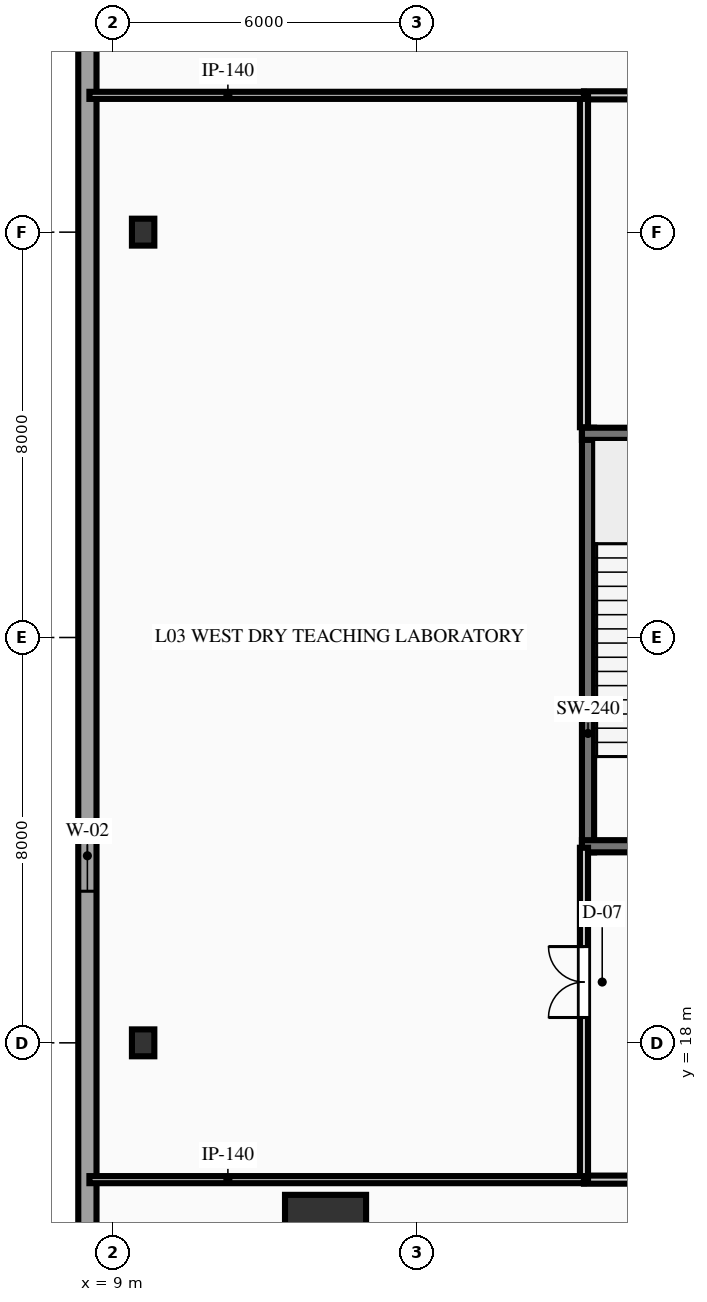
"""IFC4 building model, lengths in metres.
Left out: names, types, materials, properties, quantities, classifications, styles, units other than length and angle.
Written with IfcOpenShell. Run it as: python <this file> out.ifc"""

import sys

from ifc_helpers import new_model, si_unit, direction, frame, frame_2d, origin, origin_2d, place, context, subcontext, project, spatial, rectangle, hollow_rectangle, i_section, extrude, element, fill, save


model = new_model("IFC4")
c1 = context("Model", 3, precision=1e-05, world=origin(), true_north=direction((0.0, 1.0)))
c2 = subcontext(c1, "Body", "Model", "MODEL_VIEW")
j1 = project(units=[si_unit("LENGTHUNIT", "METRE"), si_unit("PLANEANGLEUNIT", "RADIAN")], contexts=[c1])
p1 = place(None, origin())
s1 = spatial("IfcSite", under=j1, at=p1, CompositionType="ELEMENT")
p2 = place(p1, origin())
s2 = spatial("IfcBuilding", under=s1, at=p2, CompositionType="ELEMENT")
p3 = place(p2, frame((0.0, 0.0, 16.8)))
s3 = spatial("IfcBuildingStorey", under=s2, at=p3, CompositionType="ELEMENT", Elevation=16.8)
p4 = place(p3, frame((18.38, 21.76, 0.0), z_axis=(0.0, 0.0, 1.0), x_axis=(0.0, 1.0, 0.0)))
e1 = element("IfcWall", 1, at=p4, inside=s3, PredefinedType="SHEAR", context=c2, shape_type="SweptSolid", body=[
    extrude(rectangle(XDim=8.38, YDim=0.24, at=frame_2d((4.19, 0.0))), origin(), (0.0, 0.0, 1.0), 5.4),
])
p5 = place(p3, frame((18.26, 21.88, 0.0), z_axis=(0.0, 0.0, 1.0), x_axis=(1.0, 0.0, 0.0)))
e2 = element("IfcWall", 2, at=p5, inside=s3, PredefinedType="SHEAR", context=c2, shape_type="SweptSolid", body=[
    extrude(rectangle(XDim=3.98, YDim=0.24, at=frame_2d((1.99, 0.0))), origin(), (0.0, 0.0, 1.0), 5.4),
])
p6 = place(p5, frame((1.465, 0.0, 0.0)))
e3 = element("IfcOpeningElement", 3, at=p6, cuts=e2, PredefinedType="OPENING", context=c2, shape_type="SweptSolid", body=[
    extrude(rectangle(XDim=1.05, YDim=2.15, at=frame_2d((0.525, 1.075))), frame((0.0, 0.13, 0.0), z_axis=(0.0, -1.0, 0.0), x_axis=(1.0, 0.0, 0.0)), (0.0, 0.0, 1.0), 0.26),
])
p7 = place(p3, frame((18.26, 30.02, 0.0), z_axis=(0.0, 0.0, 1.0), x_axis=(1.0, 0.0, 0.0)))
e4 = element("IfcWall", 4, at=p7, inside=s3, PredefinedType="SHEAR", context=c2, shape_type="SweptSolid", body=[
    extrude(rectangle(XDim=3.98, YDim=0.24, at=frame_2d((1.99, 0.0))), origin(), (0.0, 0.0, 1.0), 5.4),
])
p8 = place(p3, frame((13.2, 14.2, 0.0), z_axis=(0.0, 0.0, 1.0), x_axis=(1.0, 0.0, 0.0)))
e5 = element("IfcColumn", 5, at=p8, inside=s3, PredefinedType="COLUMN", context=c2, shape_type="SweptSolid", body=[
    extrude(hollow_rectangle(XDim=1.6, YDim=1.6, WallThickness=0.08, at=origin_2d()), origin(), (0.0, 0.0, 1.0), 5.4),
])
for number, where, z_axis, x_axis in (
    (6, (9.6, 18.0, 0.0), (0.0, 0.0, 1.0), (1.0, 0.0, 0.0)),
    (7, (9.6, 34.0, 0.0), (0.0, 0.0, 1.0), (1.0, 0.0, 0.0)),
):
    element("IfcColumn", number, at=place(p3, frame(where, z_axis=z_axis, x_axis=x_axis)), inside=s3, PredefinedType="COLUMN", context=c2, shape_type="SweptSolid", body=[
        extrude(i_section(OverallWidth=0.442, OverallDepth=0.531, WebThickness=0.066, FlangeThickness=0.106, at=origin_2d()), origin(), (0.0, 0.0, 1.0), 5.4),
    ])
p9 = place(p3, frame((8.5, 12.2, 0.0), z_axis=(0.0, 0.0, 1.0), x_axis=(0.0, 1.0, 0.0)))
e8 = element("IfcWall", 8, at=p9, inside=s3, PredefinedType="STANDARD", context=c2, shape_type="SweptSolid", body=[
    extrude(rectangle(XDim=31.4, YDim=0.36, at=frame_2d((15.7, 0.0))), origin(), (0.0, 0.0, 1.0), 4.98),
])
p10 = place(p9, frame((8.792, 0.0, 1.0)))
e9 = element("IfcOpeningElement", 9, at=p10, cuts=e8, PredefinedType="OPENING", context=c2, shape_type="SweptSolid", body=[
    extrude(rectangle(XDim=1.4, YDim=2.2, at=frame_2d((0.7, 1.1))), frame((0.0, 0.19, 0.0), z_axis=(0.0, -1.0, 0.0), x_axis=(1.0, 0.0, 0.0)), (0.0, 0.0, 1.0), 0.38),
])
p11 = place(p3, frame((18.3, 15.3, 0.0), z_axis=(0.0, 0.0, 1.0), x_axis=(1.0, 0.0, 0.0)))
e10 = element("IfcWall", 10, at=p11, inside=s3, PredefinedType="PARTITIONING", context=c2, shape_type="SweptSolid", body=[
    extrude(rectangle(XDim=35.4, YDim=0.16, at=frame_2d((17.7, 0.0))), origin(), (0.0, 0.0, 1.0), 4.202),
])
p12 = place(p11, frame((6.525, 0.0, 0.0)))
e11 = element("IfcOpeningElement", 11, at=p12, cuts=e10, PredefinedType="OPENING", context=c2, shape_type="SweptSolid", body=[
    extrude(rectangle(XDim=1.05, YDim=2.15, at=frame_2d((0.525, 1.075))), frame((0.0, 0.09, 0.0), z_axis=(0.0, -1.0, 0.0), x_axis=(1.0, 0.0, 0.0)), (0.0, 0.0, 1.0), 0.18),
])
p13 = place(p11, frame((16.7, 0.0, 0.0)))
e12 = element("IfcOpeningElement", 12, at=p13, cuts=e10, PredefinedType="OPENING", context=c2, shape_type="SweptSolid", body=[
    extrude(rectangle(XDim=1.4, YDim=2.2, at=frame_2d((0.7, 1.1))), frame((0.0, 0.09, 0.0), z_axis=(0.0, -1.0, 0.0), x_axis=(1.0, 0.0, 0.0)), (0.0, 0.0, 1.0), 0.18),
])
p14 = place(p11, frame((27.525, 0.0, 0.0)))
e13 = element("IfcOpeningElement", 13, at=p14, cuts=e10, PredefinedType="OPENING", context=c2, shape_type="SweptSolid", body=[
    extrude(rectangle(XDim=1.05, YDim=2.15, at=frame_2d((0.525, 1.075))), frame((0.0, 0.09, 0.0), z_axis=(0.0, -1.0, 0.0), x_axis=(1.0, 0.0, 0.0)), (0.0, 0.0, 1.0), 0.18),
])
p15 = place(p3, frame((18.3, 36.7, 0.0), z_axis=(0.0, 0.0, 1.0), x_axis=(1.0, 0.0, 0.0)))
e14 = element("IfcWall", 14, at=p15, inside=s3, PredefinedType="PARTITIONING", context=c2, shape_type="SweptSolid", body=[
    extrude(rectangle(XDim=35.4, YDim=0.16, at=frame_2d((17.7, 0.0))), origin(), (0.0, 0.0, 1.0), 4.98),
])
p16 = place(p15, frame((4.125, 0.0, 0.0)))
e15 = element("IfcOpeningElement", 15, at=p16, cuts=e14, PredefinedType="OPENING", context=c2, shape_type="SweptSolid", body=[
    extrude(rectangle(XDim=1.05, YDim=2.15, at=frame_2d((0.525, 1.075))), frame((0.0, 0.09, 0.0), z_axis=(0.0, -1.0, 0.0), x_axis=(1.0, 0.0, 0.0)), (0.0, 0.0, 1.0), 0.18),
])
p17 = place(p15, frame((16.375, 0.0, 0.0)))
e16 = element("IfcOpeningElement", 16, at=p17, cuts=e14, PredefinedType="OPENING", context=c2, shape_type="SweptSolid", body=[
    extrude(rectangle(XDim=1.05, YDim=2.15, at=frame_2d((0.525, 1.075))), frame((0.0, 0.09, 0.0), z_axis=(0.0, -1.0, 0.0), x_axis=(1.0, 0.0, 0.0)), (0.0, 0.0, 1.0), 0.18),
])
p18 = place(p15, frame((27.225, 0.0, 0.0)))
e17 = element("IfcOpeningElement", 17, at=p18, cuts=e14, PredefinedType="OPENING", context=c2, shape_type="SweptSolid", body=[
    extrude(rectangle(XDim=0.95, YDim=2.15, at=frame_2d((0.475, 1.075))), frame((0.0, 0.09, 0.0), z_axis=(0.0, -1.0, 0.0), x_axis=(1.0, 0.0, 0.0)), (0.0, 0.0, 1.0), 0.18),
])
p19 = place(p15, frame((30.275, 0.0, 0.0)))
e18 = element("IfcOpeningElement", 18, at=p19, cuts=e14, PredefinedType="OPENING", context=c2, shape_type="SweptSolid", body=[
    extrude(rectangle(XDim=0.95, YDim=2.15, at=frame_2d((0.475, 1.075))), frame((0.0, 0.09, 0.0), z_axis=(0.0, -1.0, 0.0), x_axis=(1.0, 0.0, 0.0)), (0.0, 0.0, 1.0), 0.18),
])
p20 = place(p15, frame((33.3, 0.0, 0.0)))
e19 = element("IfcOpeningElement", 19, at=p20, cuts=e14, PredefinedType="OPENING", context=c2, shape_type="SweptSolid", body=[
    extrude(rectangle(XDim=1.0, YDim=2.15, at=frame_2d((0.5, 1.075))), frame((0.0, 0.09, 0.0), z_axis=(0.0, -1.0, 0.0), x_axis=(1.0, 0.0, 0.0)), (0.0, 0.0, 1.0), 0.18),
])
p21 = place(p3, frame((18.3, 15.3, 0.0), z_axis=(0.0, 0.0, 1.0), x_axis=(0.0, 1.0, 0.0)))
e20 = element("IfcWall", 20, at=p21, inside=s3, PredefinedType="PARTITIONING", context=c2, shape_type="SweptSolid", body=[
    extrude(rectangle(XDim=6.55, YDim=0.16, at=frame_2d((3.275, 0.0))), origin(), (0.0, 0.0, 1.0), 4.98),
])
p22 = place(p21, frame((3.2, 0.0, 0.0)))
e21 = element("IfcOpeningElement", 21, at=p22, cuts=e20, PredefinedType="OPENING", context=c2, shape_type="SweptSolid", body=[
    extrude(rectangle(XDim=1.4, YDim=2.2, at=frame_2d((0.7, 1.1))), frame((0.0, 0.09, 0.0), z_axis=(0.0, -1.0, 0.0), x_axis=(1.0, 0.0, 0.0)), (0.0, 0.0, 1.0), 0.18),
])
p23 = place(p3, frame((18.3, 30.15, 0.0), z_axis=(0.0, 0.0, 1.0), x_axis=(0.0, 1.0, 0.0)))
e22 = element("IfcWall", 22, at=p23, inside=s3, PredefinedType="PARTITIONING", context=c2, shape_type="SweptSolid", body=[
    extrude(rectangle(XDim=6.55, YDim=0.16, at=frame_2d((3.275, 0.0))), origin(), (0.0, 0.0, 1.0), 4.98),
])
p24 = place(p3, frame((8.54, 15.3, 0.0), z_axis=(0.0, 0.0, 1.0), x_axis=(1.0, 0.0, 0.0)))
e23 = element("IfcWall", 23, at=p24, inside=s3, PredefinedType="PARTITIONING", context=c2, shape_type="SweptSolid", body=[
    extrude(rectangle(XDim=9.76, YDim=0.14, at=frame_2d((4.88, 0.0))), origin(), (0.0, 0.0, 1.0), 4.202),
])
p25 = place(p3, frame((8.54, 36.7, 0.0), z_axis=(0.0, 0.0, 1.0), x_axis=(1.0, 0.0, 0.0)))
e24 = element("IfcWall", 24, at=p25, inside=s3, PredefinedType="PARTITIONING", context=c2, shape_type="SweptSolid", body=[
    extrude(rectangle(XDim=9.76, YDim=0.14, at=frame_2d((4.88, 0.0))), origin(), (0.0, 0.0, 1.0), 4.98),
])
p26 = place(p10, origin())
e25 = element("IfcWindow", 25, at=p26, inside=s3, PartitioningType="SINGLE_PANEL", PredefinedType="WINDOW", context=c2, shape_type="SweptSolid", body=[
    extrude(rectangle(XDim=1.4, YDim=2.2, at=frame_2d((0.7, 1.1))), frame((0.0, 0.03, 0.0), z_axis=(0.0, -1.0, 0.0), x_axis=(1.0, 0.0, 0.0)), (0.0, 0.0, 1.0), 0.06),
])
fill(e9, e25)
p27 = place(p22, origin())
e26 = element("IfcDoor", 26, at=p27, inside=s3, OperationType="DOUBLE_DOOR_SINGLE_SWING", PredefinedType="DOOR", context=c2, shape_type="SweptSolid", body=[
    extrude(rectangle(XDim=1.4, YDim=2.2, at=frame_2d((0.7, 1.1))), frame((0.0, 0.025, 0.0), z_axis=(0.0, -1.0, 0.0), x_axis=(1.0, 0.0, 0.0)), (0.0, 0.0, 1.0), 0.05),
])
fill(e21, e26)
save(model, sys.argv[1])
